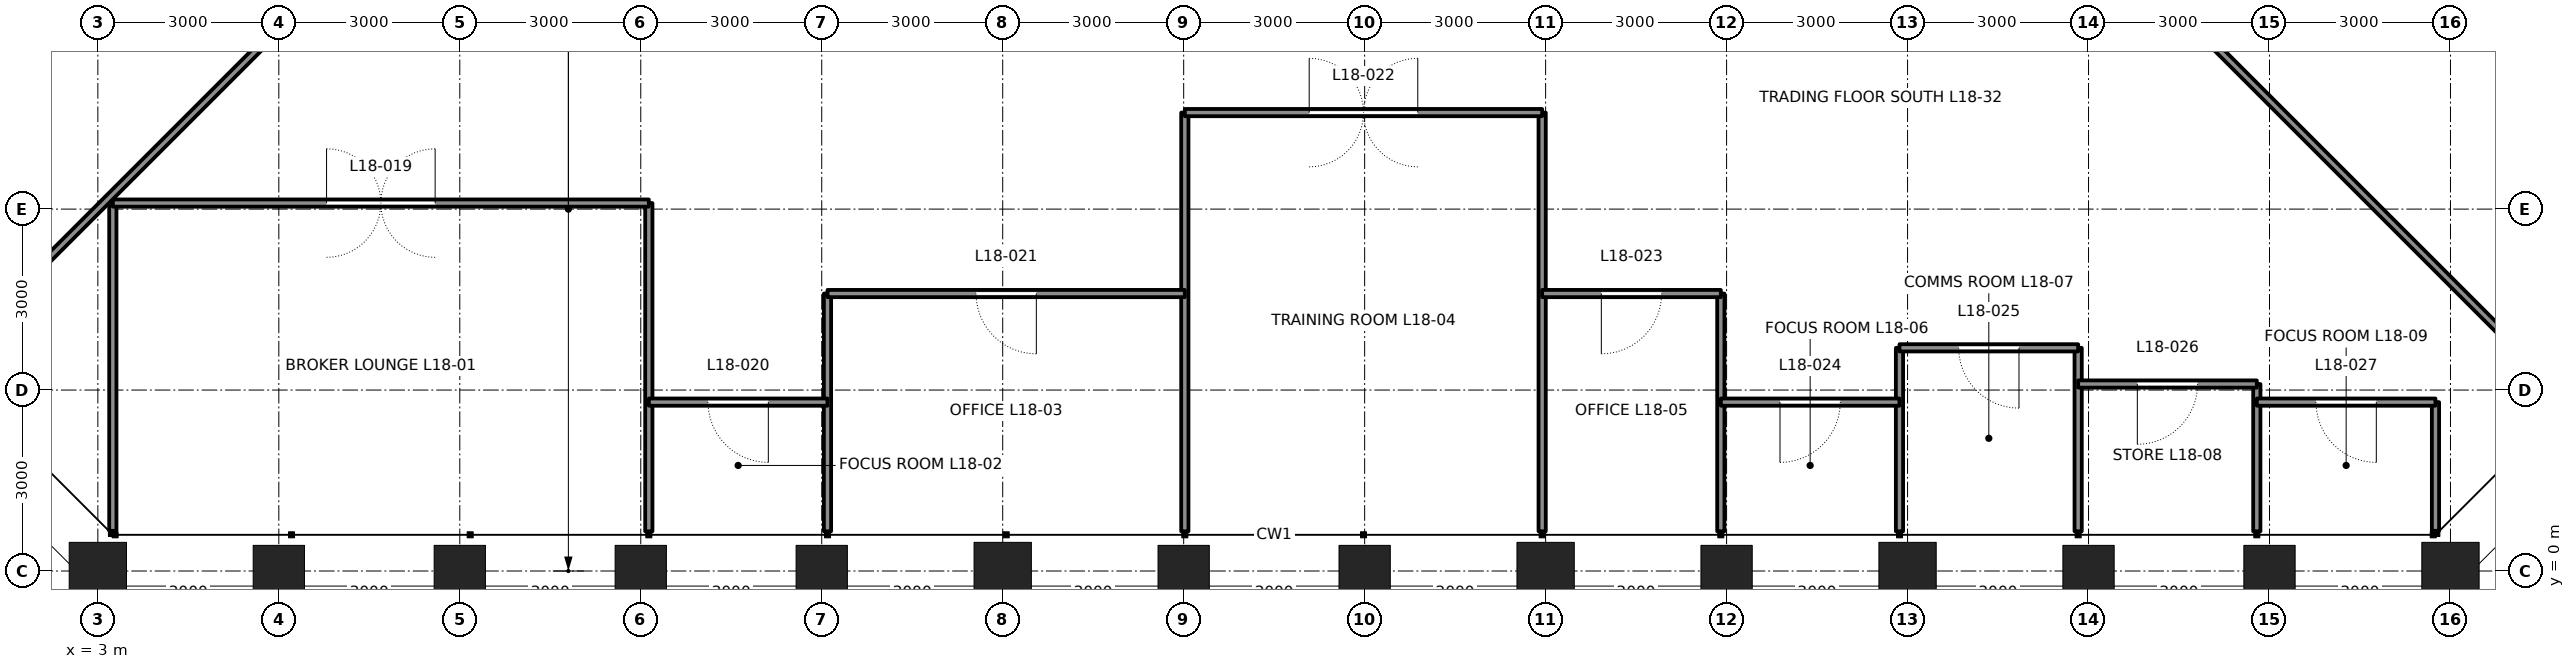
"""IFC4 building model, lengths in metres.
Left out: names, types, materials, properties, quantities, classifications, styles, units other than length and angle.
Written with IfcOpenShell. Run it as: python <this file> out.ifc"""

import sys

from ifc_helpers import new_model, si_unit, direction, frame, frame_2d, origin, origin_2d, place, context, subcontext, project, spatial, rectangle, hollow_rectangle, extrude, element, fill, save


model = new_model("IFC4")
c1 = context("Model", 3, precision=1e-05, world=origin(), true_north=direction((0.0, 1.0)))
c2 = subcontext(c1, "Body", "Model", "MODEL_VIEW")
j1 = project(units=[si_unit("LENGTHUNIT", "METRE"), si_unit("PLANEANGLEUNIT", "RADIAN")], contexts=[c1])
p1 = place(None, origin())
s1 = spatial("IfcSite", under=j1, at=p1, CompositionType="ELEMENT")
p2 = place(p1, origin())
s2 = spatial("IfcBuilding", under=s1, at=p2, CompositionType="ELEMENT")
p3 = place(p2, frame((0.0, 0.0, 87.3)))
s3 = spatial("IfcBuildingStorey", under=s2, at=p3, CompositionType="ELEMENT", Elevation=87.3)
p4 = place(p3, frame((3.0, 0.0, 0.0), z_axis=(0.0, 0.0, 1.0), x_axis=(0.0, -1.0, 0.0)))
e1 = element("IfcColumn", 1, at=p4, inside=s3, PredefinedType="COLUMN", context=c2, shape_type="SweptSolid", body=[
    extrude(hollow_rectangle(XDim=0.95, YDim=0.95, WallThickness=0.095, at=origin_2d()), origin(), (0.0, 0.0, 1.0), 4.5),
])
for number, where, z_axis, x_axis in (
    (2, (6.0, 0.0, 0.0), (0.0, 0.0, 1.0), (0.0, -1.0, 0.0)),
    (3, (9.0, 0.0, 0.0), (0.0, 0.0, 1.0), (0.0, -1.0, 0.0)),
    (4, (12.0, 0.0, 0.0), (0.0, 0.0, 1.0), (0.0, -1.0, 0.0)),
    (5, (15.0, 0.0, 0.0), (0.0, 0.0, 1.0), (0.0, -1.0, 0.0)),
):
    element("IfcColumn", number, at=place(p3, frame(where, z_axis=z_axis, x_axis=x_axis)), inside=s3, PredefinedType="COLUMN", context=c2, shape_type="SweptSolid", body=[
        extrude(hollow_rectangle(XDim=0.85, YDim=0.85, WallThickness=0.085, at=origin_2d()), origin(), (0.0, 0.0, 1.0), 4.5),
    ])
p5 = place(p3, frame((18.0, 0.0, 0.0), z_axis=(0.0, 0.0, 1.0), x_axis=(0.0, -1.0, 0.0)))
e6 = element("IfcColumn", 6, at=p5, inside=s3, PredefinedType="COLUMN", context=c2, shape_type="SweptSolid", body=[
    extrude(hollow_rectangle(XDim=0.95, YDim=0.95, WallThickness=0.11, at=origin_2d()), origin(), (0.0, 0.0, 1.0), 4.5),
])
for number, where, z_axis, x_axis in (
    (7, (21.0, 0.0, 0.0), (0.0, 0.0, 1.0), (0.0, -1.0, 0.0)),
    (8, (24.0, 0.0, 0.0), (0.0, 0.0, 1.0), (0.0, -1.0, 0.0)),
):
    element("IfcColumn", number, at=place(p3, frame(where, z_axis=z_axis, x_axis=x_axis)), inside=s3, PredefinedType="COLUMN", context=c2, shape_type="SweptSolid", body=[
        extrude(hollow_rectangle(XDim=0.85, YDim=0.85, WallThickness=0.085, at=origin_2d()), origin(), (0.0, 0.0, 1.0), 4.5),
    ])
p6 = place(p3, frame((27.0, 0.0, 0.0), z_axis=(0.0, 0.0, 1.0), x_axis=(0.0, -1.0, 0.0)))
e9 = element("IfcColumn", 9, at=p6, inside=s3, PredefinedType="COLUMN", context=c2, shape_type="SweptSolid", body=[
    extrude(hollow_rectangle(XDim=0.95, YDim=0.95, WallThickness=0.11, at=origin_2d()), origin(), (0.0, 0.0, 1.0), 4.5),
])
p7 = place(p3, frame((30.0, 0.0, 0.0), z_axis=(0.0, 0.0, 1.0), x_axis=(0.0, -1.0, 0.0)))
e10 = element("IfcColumn", 10, at=p7, inside=s3, PredefinedType="COLUMN", context=c2, shape_type="SweptSolid", body=[
    extrude(hollow_rectangle(XDim=0.85, YDim=0.85, WallThickness=0.085, at=origin_2d()), origin(), (0.0, 0.0, 1.0), 4.5),
])
p8 = place(p3, frame((33.0, 0.0, 0.0), z_axis=(0.0, 0.0, 1.0), x_axis=(0.0, -1.0, 0.0)))
e11 = element("IfcColumn", 11, at=p8, inside=s3, PredefinedType="COLUMN", context=c2, shape_type="SweptSolid", body=[
    extrude(hollow_rectangle(XDim=0.95, YDim=0.95, WallThickness=0.11, at=origin_2d()), origin(), (0.0, 0.0, 1.0), 4.5),
])
for number, where, z_axis, x_axis in (
    (12, (36.0, 0.0, 0.0), (0.0, 0.0, 1.0), (0.0, -1.0, 0.0)),
    (13, (39.0, 0.0, 0.0), (0.0, 0.0, 1.0), (0.0, -1.0, 0.0)),
):
    element("IfcColumn", number, at=place(p3, frame(where, z_axis=z_axis, x_axis=x_axis)), inside=s3, PredefinedType="COLUMN", context=c2, shape_type="SweptSolid", body=[
        extrude(hollow_rectangle(XDim=0.85, YDim=0.85, WallThickness=0.085, at=origin_2d()), origin(), (0.0, 0.0, 1.0), 4.5),
    ])
p9 = place(p3, frame((42.0, 0.0, 0.0), z_axis=(0.0, 0.0, 1.0), x_axis=(0.0, -1.0, 0.0)))
e14 = element("IfcColumn", 14, at=p9, inside=s3, PredefinedType="COLUMN", context=c2, shape_type="SweptSolid", body=[
    extrude(hollow_rectangle(XDim=0.95, YDim=0.95, WallThickness=0.095, at=origin_2d()), origin(), (0.0, 0.0, 1.0), 4.5),
])
p10 = place(p3, frame((3.249, 0.666, -0.3), z_axis=(0.0, 0.0, 1.0), x_axis=(0.0, 1.0, 0.0)))
e15 = element("IfcWall", 15, at=p10, inside=s3, PredefinedType="PARTITIONING", context=c2, shape_type="SweptSolid", body=[
    extrude(rectangle(XDim=5.434, YDim=0.12, at=frame_2d((2.717, 0.0))), origin(), (0.0, 0.0, 1.0), 4.34),
])
p11 = place(p3, frame((12.134, 0.657, -0.3), z_axis=(0.0, 0.0, 1.0), x_axis=(0.0, 1.0, 0.0)))
e16 = element("IfcWall", 16, at=p11, inside=s3, PredefinedType="PARTITIONING", context=c2, shape_type="SweptSolid", body=[
    extrude(rectangle(XDim=5.443, YDim=0.12, at=frame_2d((2.721, 0.0))), origin(), (0.0, 0.0, 1.0), 3.481),
])
p12 = place(p3, frame((15.096, 0.657, -0.3), z_axis=(0.0, 0.0, 1.0), x_axis=(0.0, 1.0, 0.0)))
e17 = element("IfcWall", 17, at=p12, inside=s3, PredefinedType="PARTITIONING", context=c2, shape_type="SweptSolid", body=[
    extrude(rectangle(XDim=3.943, YDim=0.12, at=frame_2d((1.971, 0.0))), origin(), (0.0, 0.0, 1.0), 3.646),
])
for number, where, z_axis, x_axis in (
    (18, (21.019, 0.657, -0.3), (0.0, 0.0, 1.0), (0.0, 1.0, 0.0)),
    (19, (26.943, 0.657, -0.3), (0.0, 0.0, 1.0), (0.0, 1.0, 0.0)),
):
    element("IfcWall", number, at=place(p3, frame(where, z_axis=z_axis, x_axis=x_axis)), inside=s3, PredefinedType="PARTITIONING", context=c2, shape_type="SweptSolid", body=[
        extrude(rectangle(XDim=6.943, YDim=0.12, at=frame_2d((3.471, 0.0))), origin(), (0.0, 0.0, 1.0), 3.646),
    ])
p13 = place(p3, frame((29.904, 0.657, -0.3), z_axis=(0.0, 0.0, 1.0), x_axis=(0.0, 1.0, 0.0)))
e20 = element("IfcWall", 20, at=p13, inside=s3, PredefinedType="PARTITIONING", context=c2, shape_type="SweptSolid", body=[
    extrude(rectangle(XDim=3.943, YDim=0.12, at=frame_2d((1.971, 0.0))), origin(), (0.0, 0.0, 1.0), 3.646),
])
p14 = place(p3, frame((32.866, 0.657, -0.3), z_axis=(0.0, 0.0, 1.0), x_axis=(0.0, 1.0, 0.0)))
e21 = element("IfcWall", 21, at=p14, inside=s3, PredefinedType="PARTITIONING", context=c2, shape_type="SweptSolid", body=[
    extrude(rectangle(XDim=3.042, YDim=0.12, at=frame_2d((1.521, 0.0))), origin(), (0.0, 0.0, 1.0), 3.481),
])
p15 = place(p3, frame((35.828, 0.657, -0.3), z_axis=(0.0, 0.0, 1.0), x_axis=(0.0, 1.0, 0.0)))
e22 = element("IfcWall", 22, at=p15, inside=s3, PredefinedType="PARTITIONING", context=c2, shape_type="SweptSolid", body=[
    extrude(rectangle(XDim=3.042, YDim=0.12, at=frame_2d((1.521, 0.0))), origin(), (0.0, 0.0, 1.0), 4.34),
])
p16 = place(p3, frame((38.79, 0.657, -0.3), z_axis=(0.0, 0.0, 1.0), x_axis=(0.0, 1.0, 0.0)))
e23 = element("IfcWall", 23, at=p16, inside=s3, PredefinedType="PARTITIONING", context=c2, shape_type="SweptSolid", body=[
    extrude(rectangle(XDim=2.443, YDim=0.12, at=frame_2d((1.221, 0.0))), origin(), (0.0, 0.0, 1.0), 4.34),
])
p17 = place(p3, frame((41.751, 0.666, -0.3), z_axis=(0.0, 0.0, 1.0), x_axis=(0.0, 1.0, 0.0)))
e24 = element("IfcWall", 24, at=p17, inside=s3, PredefinedType="PARTITIONING", context=c2, shape_type="SweptSolid", body=[
    extrude(rectangle(XDim=2.134, YDim=0.12, at=frame_2d((1.067, 0.0))), origin(), (0.0, 0.0, 1.0), 4.34),
])
p18 = place(p3, frame((3.249, 6.1, -0.3), z_axis=(0.0, 0.0, 1.0), x_axis=(1.0, 0.0, 0.0)))
e25 = element("IfcWall", 25, at=p18, inside=s3, PredefinedType="PARTITIONING", context=c2, shape_type="SweptSolid", body=[
    extrude(rectangle(XDim=8.885, YDim=0.12, at=frame_2d((4.443, 0.0))), origin(), (0.0, 0.0, 1.0), 3.723),
])
p19 = place(p18, frame((3.543, 0.0, 0.3)))
e26 = element("IfcOpeningElement", 26, at=p19, cuts=e25, PredefinedType="OPENING", context=c2, shape_type="SweptSolid", body=[
    extrude(rectangle(XDim=1.8, YDim=2.4, at=frame_2d((0.9, 1.2))), frame((0.0, 0.07, 0.0), z_axis=(0.0, -1.0, 0.0), x_axis=(1.0, 0.0, 0.0)), (0.0, 0.0, 1.0), 0.14),
])
p20 = place(p3, frame((12.134, 2.8, -0.3), z_axis=(0.0, 0.0, 1.0), x_axis=(1.0, 0.0, 0.0)))
e27 = element("IfcWall", 27, at=p20, inside=s3, PredefinedType="PARTITIONING", context=c2, shape_type="SweptSolid", body=[
    extrude(rectangle(XDim=2.962, YDim=0.12, at=frame_2d((1.481, 0.0))), origin(), (0.0, 0.0, 1.0), 4.34),
])
p21 = place(p20, frame((0.981, 0.0, 0.3)))
e28 = element("IfcOpeningElement", 28, at=p21, cuts=e27, PredefinedType="OPENING", context=c2, shape_type="SweptSolid", body=[
    extrude(rectangle(XDim=1.0, YDim=2.4, at=frame_2d((0.5, 1.2))), frame((0.0, 0.07, 0.0), z_axis=(0.0, -1.0, 0.0), x_axis=(1.0, 0.0, 0.0)), (0.0, 0.0, 1.0), 0.14),
])
p22 = place(p3, frame((15.096, 4.6, -0.3), z_axis=(0.0, 0.0, 1.0), x_axis=(1.0, 0.0, 0.0)))
e29 = element("IfcWall", 29, at=p22, inside=s3, PredefinedType="PARTITIONING", context=c2, shape_type="SweptSolid", body=[
    extrude(rectangle(XDim=5.923, YDim=0.12, at=frame_2d((2.962, 0.0))), origin(), (0.0, 0.0, 1.0), 4.34),
])
p23 = place(p22, frame((2.462, 0.0, 0.3)))
e30 = element("IfcOpeningElement", 30, at=p23, cuts=e29, PredefinedType="OPENING", context=c2, shape_type="SweptSolid", body=[
    extrude(rectangle(XDim=1.0, YDim=2.4, at=frame_2d((0.5, 1.2))), frame((0.0, 0.07, 0.0), z_axis=(0.0, -1.0, 0.0), x_axis=(1.0, 0.0, 0.0)), (0.0, 0.0, 1.0), 0.14),
])
p24 = place(p3, frame((21.019, 7.6, -0.3), z_axis=(0.0, 0.0, 1.0), x_axis=(1.0, 0.0, 0.0)))
e31 = element("IfcWall", 31, at=p24, inside=s3, PredefinedType="PARTITIONING", context=c2, shape_type="SweptSolid", body=[
    extrude(rectangle(XDim=5.924, YDim=0.12, at=frame_2d((2.962, 0.0))), origin(), (0.0, 0.0, 1.0), 4.34),
])
p25 = place(p24, frame((2.062, 0.0, 0.3)))
e32 = element("IfcOpeningElement", 32, at=p25, cuts=e31, PredefinedType="OPENING", context=c2, shape_type="SweptSolid", body=[
    extrude(rectangle(XDim=1.8, YDim=2.4, at=frame_2d((0.9, 1.2))), frame((0.0, 0.07, 0.0), z_axis=(0.0, -1.0, 0.0), x_axis=(1.0, 0.0, 0.0)), (0.0, 0.0, 1.0), 0.14),
])
p26 = place(p3, frame((26.943, 4.6, -0.3), z_axis=(0.0, 0.0, 1.0), x_axis=(1.0, 0.0, 0.0)))
e33 = element("IfcWall", 33, at=p26, inside=s3, PredefinedType="PARTITIONING", context=c2, shape_type="SweptSolid", body=[
    extrude(rectangle(XDim=2.962, YDim=0.12, at=frame_2d((1.481, 0.0))), origin(), (0.0, 0.0, 1.0), 4.34),
])
p27 = place(p26, frame((0.981, 0.0, 0.3)))
e34 = element("IfcOpeningElement", 34, at=p27, cuts=e33, PredefinedType="OPENING", context=c2, shape_type="SweptSolid", body=[
    extrude(rectangle(XDim=1.0, YDim=2.4, at=frame_2d((0.5, 1.2))), frame((0.0, 0.07, 0.0), z_axis=(0.0, -1.0, 0.0), x_axis=(1.0, 0.0, 0.0)), (0.0, 0.0, 1.0), 0.14),
])
p28 = place(p3, frame((29.904, 2.8, -0.3), z_axis=(0.0, 0.0, 1.0), x_axis=(1.0, 0.0, 0.0)))
e35 = element("IfcWall", 35, at=p28, inside=s3, PredefinedType="PARTITIONING", context=c2, shape_type="SweptSolid", body=[
    extrude(rectangle(XDim=2.962, YDim=0.12, at=frame_2d((1.481, 0.0))), origin(), (0.0, 0.0, 1.0), 4.34),
])
p29 = place(p28, frame((0.981, 0.0, 0.3)))
e36 = element("IfcOpeningElement", 36, at=p29, cuts=e35, PredefinedType="OPENING", context=c2, shape_type="SweptSolid", body=[
    extrude(rectangle(XDim=1.0, YDim=2.4, at=frame_2d((0.5, 1.2))), frame((0.0, 0.07, 0.0), z_axis=(0.0, -1.0, 0.0), x_axis=(1.0, 0.0, 0.0)), (0.0, 0.0, 1.0), 0.14),
])
p30 = place(p3, frame((32.866, 3.7, -0.3), z_axis=(0.0, 0.0, 1.0), x_axis=(1.0, 0.0, 0.0)))
e37 = element("IfcWall", 37, at=p30, inside=s3, PredefinedType="PARTITIONING", context=c2, shape_type="SweptSolid", body=[
    extrude(rectangle(XDim=2.962, YDim=0.12, at=frame_2d((1.481, 0.0))), origin(), (0.0, 0.0, 1.0), 4.34),
])
p31 = place(p30, frame((0.981, 0.0, 0.3)))
e38 = element("IfcOpeningElement", 38, at=p31, cuts=e37, PredefinedType="OPENING", context=c2, shape_type="SweptSolid", body=[
    extrude(rectangle(XDim=1.0, YDim=2.4, at=frame_2d((0.5, 1.2))), frame((0.0, 0.07, 0.0), z_axis=(0.0, -1.0, 0.0), x_axis=(1.0, 0.0, 0.0)), (0.0, 0.0, 1.0), 0.14),
])
p32 = place(p3, frame((35.828, 3.1, -0.3), z_axis=(0.0, 0.0, 1.0), x_axis=(1.0, 0.0, 0.0)))
e39 = element("IfcWall", 39, at=p32, inside=s3, PredefinedType="PARTITIONING", context=c2, shape_type="SweptSolid", body=[
    extrude(rectangle(XDim=2.962, YDim=0.12, at=frame_2d((1.481, 0.0))), origin(), (0.0, 0.0, 1.0), 3.723),
])
p33 = place(p32, frame((0.981, 0.0, 0.3)))
e40 = element("IfcOpeningElement", 40, at=p33, cuts=e39, PredefinedType="OPENING", context=c2, shape_type="SweptSolid", body=[
    extrude(rectangle(XDim=1.0, YDim=2.4, at=frame_2d((0.5, 1.2))), frame((0.0, 0.07, 0.0), z_axis=(0.0, -1.0, 0.0), x_axis=(1.0, 0.0, 0.0)), (0.0, 0.0, 1.0), 0.14),
])
p34 = place(p3, frame((38.79, 2.8, -0.3), z_axis=(0.0, 0.0, 1.0), x_axis=(1.0, 0.0, 0.0)))
e41 = element("IfcWall", 41, at=p34, inside=s3, PredefinedType="PARTITIONING", context=c2, shape_type="SweptSolid", body=[
    extrude(rectangle(XDim=2.962, YDim=0.12, at=frame_2d((1.481, 0.0))), origin(), (0.0, 0.0, 1.0), 4.34),
])
p35 = place(p34, frame((0.981, 0.0, 0.3)))
e42 = element("IfcOpeningElement", 42, at=p35, cuts=e41, PredefinedType="OPENING", context=c2, shape_type="SweptSolid", body=[
    extrude(rectangle(XDim=1.0, YDim=2.4, at=frame_2d((0.5, 1.2))), frame((0.0, 0.07, 0.0), z_axis=(0.0, -1.0, 0.0), x_axis=(1.0, 0.0, 0.0)), (0.0, 0.0, 1.0), 0.14),
])
p36 = place(p3, frame((9.0, 12.0, -0.3), z_axis=(0.0, 0.0, 1.0), x_axis=(-0.707106781187, -0.707106781187, 0.0)))
e43 = element("IfcWall", 43, at=p36, inside=s3, PredefinedType="PARTITIONING", context=c2, shape_type="SweptSolid", body=[
    extrude(rectangle(XDim=11.842, YDim=0.12, at=frame_2d((5.921, 0.0))), origin(), (0.0, 0.0, 1.0), 4.34),
])
p37 = place(p36, frame((1.3, 0.0, 0.3)))
e44 = element("IfcOpeningElement", 44, at=p37, cuts=e43, PredefinedType="OPENING", context=c2, shape_type="SweptSolid", body=[
    extrude(rectangle(XDim=1.0, YDim=2.4, at=frame_2d((0.5, 1.2))), frame((0.0, 0.07, 0.0), z_axis=(0.0, -1.0, 0.0), x_axis=(1.0, 0.0, 0.0)), (0.0, 0.0, 1.0), 0.14),
])
p38 = place(p3, frame((34.8, 12.0, -0.3), z_axis=(0.0, 0.0, 1.0), x_axis=(0.707106781187, -0.707106781187, 0.0)))
e45 = element("IfcWall", 45, at=p38, inside=s3, PredefinedType="PARTITIONING", context=c2, shape_type="SweptSolid", body=[
    extrude(rectangle(XDim=12.944, YDim=0.12, at=frame_2d((6.472, 0.0))), origin(), (0.0, 0.0, 1.0), 4.34),
])
p39 = place(p38, frame((1.3, 0.0, 0.3)))
e46 = element("IfcOpeningElement", 46, at=p39, cuts=e45, PredefinedType="OPENING", context=c2, shape_type="SweptSolid", body=[
    extrude(rectangle(XDim=1.0, YDim=2.4, at=frame_2d((0.5, 1.2))), frame((0.0, 0.07, 0.0), z_axis=(0.0, -1.0, 0.0), x_axis=(1.0, 0.0, 0.0)), (0.0, 0.0, 1.0), 0.14),
])
p40 = place(p19, origin())
e47 = element("IfcDoor", 47, at=p40, inside=s3, OperationType="DOUBLE_DOOR_DOUBLE_SWING", PredefinedType="DOOR", context=c2, shape_type="SweptSolid", body=[
    extrude(rectangle(XDim=1.8, YDim=2.4, at=frame_2d((0.9, 1.2))), frame((0.0, 0.025, 0.0), z_axis=(0.0, -1.0, 0.0), x_axis=(1.0, 0.0, 0.0)), (0.0, 0.0, 1.0), 0.05),
])
fill(e26, e47)
p41 = place(p21, frame((1.0, 0.0, 0.0), z_axis=(0.0, 0.0, 1.0), x_axis=(-1.0, 0.0, 0.0)))
e48 = element("IfcDoor", 48, at=p41, inside=s3, OperationType="SINGLE_SWING_LEFT", PredefinedType="DOOR", context=c2, shape_type="SweptSolid", body=[
    extrude(rectangle(XDim=1.0, YDim=2.4, at=frame_2d((0.5, 1.2))), frame((0.0, 0.025, 0.0), z_axis=(0.0, -1.0, 0.0), x_axis=(1.0, 0.0, 0.0)), (0.0, 0.0, 1.0), 0.05),
])
fill(e28, e48)
p42 = place(p23, frame((1.0, 0.0, 0.0), z_axis=(0.0, 0.0, 1.0), x_axis=(-1.0, 0.0, 0.0)))
e49 = element("IfcDoor", 49, at=p42, inside=s3, OperationType="SINGLE_SWING_LEFT", PredefinedType="DOOR", context=c2, shape_type="SweptSolid", body=[
    extrude(rectangle(XDim=1.0, YDim=2.4, at=frame_2d((0.5, 1.2))), frame((0.0, 0.025, 0.0), z_axis=(0.0, -1.0, 0.0), x_axis=(1.0, 0.0, 0.0)), (0.0, 0.0, 1.0), 0.05),
])
fill(e30, e49)
p43 = place(p25, origin())
e50 = element("IfcDoor", 50, at=p43, inside=s3, OperationType="DOUBLE_DOOR_DOUBLE_SWING", PredefinedType="DOOR", context=c2, shape_type="SweptSolid", body=[
    extrude(rectangle(XDim=1.8, YDim=2.4, at=frame_2d((0.9, 1.2))), frame((0.0, 0.025, 0.0), z_axis=(0.0, -1.0, 0.0), x_axis=(1.0, 0.0, 0.0)), (0.0, 0.0, 1.0), 0.05),
])
fill(e32, e50)
p44 = place(p27, frame((1.0, 0.0, 0.0), z_axis=(0.0, 0.0, 1.0), x_axis=(-1.0, 0.0, 0.0)))
e51 = element("IfcDoor", 51, at=p44, inside=s3, OperationType="SINGLE_SWING_RIGHT", PredefinedType="DOOR", context=c2, shape_type="SweptSolid", body=[
    extrude(rectangle(XDim=1.0, YDim=2.4, at=frame_2d((0.5, 1.2))), frame((0.0, 0.025, 0.0), z_axis=(0.0, -1.0, 0.0), x_axis=(1.0, 0.0, 0.0)), (0.0, 0.0, 1.0), 0.05),
])
fill(e34, e51)
p45 = place(p29, frame((1.0, 0.0, 0.0), z_axis=(0.0, 0.0, 1.0), x_axis=(-1.0, 0.0, 0.0)))
e52 = element("IfcDoor", 52, at=p45, inside=s3, OperationType="SINGLE_SWING_RIGHT", PredefinedType="DOOR", context=c2, shape_type="SweptSolid", body=[
    extrude(rectangle(XDim=1.0, YDim=2.4, at=frame_2d((0.5, 1.2))), frame((0.0, 0.025, 0.0), z_axis=(0.0, -1.0, 0.0), x_axis=(1.0, 0.0, 0.0)), (0.0, 0.0, 1.0), 0.05),
])
fill(e36, e52)
p46 = place(p31, frame((1.0, 0.0, 0.0), z_axis=(0.0, 0.0, 1.0), x_axis=(-1.0, 0.0, 0.0)))
e53 = element("IfcDoor", 53, at=p46, inside=s3, OperationType="SINGLE_SWING_LEFT", PredefinedType="DOOR", context=c2, shape_type="SweptSolid", body=[
    extrude(rectangle(XDim=1.0, YDim=2.4, at=frame_2d((0.5, 1.2))), frame((0.0, 0.025, 0.0), z_axis=(0.0, -1.0, 0.0), x_axis=(1.0, 0.0, 0.0)), (0.0, 0.0, 1.0), 0.05),
])
fill(e38, e53)
p47 = place(p33, frame((1.0, 0.0, 0.0), z_axis=(0.0, 0.0, 1.0), x_axis=(-1.0, 0.0, 0.0)))
e54 = element("IfcDoor", 54, at=p47, inside=s3, OperationType="SINGLE_SWING_RIGHT", PredefinedType="DOOR", context=c2, shape_type="SweptSolid", body=[
    extrude(rectangle(XDim=1.0, YDim=2.4, at=frame_2d((0.5, 1.2))), frame((0.0, 0.025, 0.0), z_axis=(0.0, -1.0, 0.0), x_axis=(1.0, 0.0, 0.0)), (0.0, 0.0, 1.0), 0.05),
])
fill(e40, e54)
p48 = place(p35, frame((1.0, 0.0, 0.0), z_axis=(0.0, 0.0, 1.0), x_axis=(-1.0, 0.0, 0.0)))
e55 = element("IfcDoor", 55, at=p48, inside=s3, OperationType="SINGLE_SWING_LEFT", PredefinedType="DOOR", context=c2, shape_type="SweptSolid", body=[
    extrude(rectangle(XDim=1.0, YDim=2.4, at=frame_2d((0.5, 1.2))), frame((0.0, 0.025, 0.0), z_axis=(0.0, -1.0, 0.0), x_axis=(1.0, 0.0, 0.0)), (0.0, 0.0, 1.0), 0.05),
])
fill(e42, e55)
save(model, sys.argv[1])
